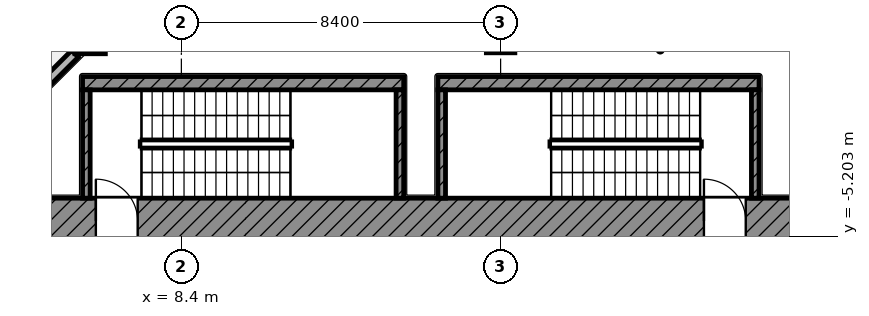
"""IFC4 building model, lengths in metres.
Left out: names, types, materials, properties, quantities, classifications, styles, units other than length and angle.
Written with IfcOpenShell. Run it as: python <this file> out.ifc"""

import sys

from ifc_helpers import new_model, si_unit, direction, frame, frame_2d, origin, origin_2d, place, context, subcontext, project, spatial, rectangle, extrude, element, fill, save


model = new_model("IFC4")
c1 = context("Model", 3, precision=1e-05, world=origin(), true_north=direction((0.0, 1.0)))
c2 = subcontext(c1, "Body", "Model", "MODEL_VIEW")
j1 = project(units=[si_unit("LENGTHUNIT", "METRE"), si_unit("PLANEANGLEUNIT", "RADIAN")], contexts=[c1])
p1 = place(None, origin())
s1 = spatial("IfcSite", under=j1, at=p1, CompositionType="ELEMENT")
p2 = place(p1, origin())
s2 = spatial("IfcBuilding", under=s1, at=p2, CompositionType="ELEMENT")
p3 = place(p2, frame((0.0, 0.0, 272.6)))
s3 = spatial("IfcBuildingStorey", under=s2, at=p3, CompositionType="ELEMENT", Elevation=272.6)
p4 = place(p3, frame((6.0, 0.0, 0.0), z_axis=(0.0, 0.0, 1.0), x_axis=(1.0, 0.0, 0.0)))
e1 = element("IfcColumn", 1, at=p4, inside=s3, PredefinedType="COLUMN", context=c2, shape_type="SweptSolid", body=[
    extrude(rectangle(XDim=0.8, YDim=0.8, at=origin_2d()), origin(), (0.0, 0.0, 1.0), 5.0),
])
p5 = place(p3, frame((16.8, 0.0, 0.0), z_axis=(0.0, 0.0, 1.0), x_axis=(1.0, 0.0, 0.0)))
e2 = element("IfcColumn", 2, at=p5, inside=s3, PredefinedType="COLUMN", context=c2, shape_type="SweptSolid", body=[
    extrude(rectangle(XDim=0.75, YDim=0.75, at=origin_2d()), origin(), (0.0, 0.0, 1.0), 5.0),
])
p6 = place(p3, frame((5.6, -0.4, 0.0), z_axis=(0.0, 0.0, 1.0), x_axis=(-0.707106781187, -0.707106781187, 0.0)))
e3 = element("IfcWall", 3, at=p6, inside=s3, PredefinedType="SOLIDWALL", context=c2, shape_type="SweptSolid", body=[
    extrude(rectangle(XDim=7.354, YDim=0.25, at=frame_2d((3.677, 0.0))), origin(), (0.0, 0.0, 1.0), 3.3),
])
p7 = place(p3, frame((4.2, -4.8, 0.0), z_axis=(0.0, 0.0, 1.0), x_axis=(1.0, 0.0, 0.0)))
e4 = element("IfcWall", 4, at=p7, inside=s3, PredefinedType="SHEAR", context=c2, shape_type="SweptSolid", body=[
    extrude(rectangle(XDim=20.5, YDim=1.2, at=frame_2d((10.25, 0.0))), origin(), (0.0, 0.0, 1.0), 4.4),
])
p8 = place(p7, frame((1.95, 0.0, 0.0)))
e5 = element("IfcOpeningElement", 5, at=p8, cuts=e4, PredefinedType="OPENING", context=c2, shape_type="SweptSolid", body=[
    extrude(rectangle(XDim=1.1, YDim=2.1, at=frame_2d((0.55, 1.05))), frame((0.0, 0.61, 0.0), z_axis=(0.0, -1.0, 0.0), x_axis=(1.0, 0.0, 0.0)), (0.0, 0.0, 1.0), 1.22),
])
p9 = place(p7, frame((17.95, 0.0, 0.0)))
e6 = element("IfcOpeningElement", 6, at=p9, cuts=e4, PredefinedType="OPENING", context=c2, shape_type="SweptSolid", body=[
    extrude(rectangle(XDim=1.1, YDim=2.1, at=frame_2d((0.55, 1.05))), frame((0.0, 0.61, 0.0), z_axis=(0.0, -1.0, 0.0), x_axis=(1.0, 0.0, 0.0)), (0.0, 0.0, 1.0), 1.22),
])
p10 = place(p3, frame((5.8, -1.175, 0.0), z_axis=(0.0, 0.0, 1.0), x_axis=(1.0, 0.0, 0.0)))
e7 = element("IfcWall", 7, at=p10, inside=s3, PredefinedType="SHEAR", context=c2, shape_type="SweptSolid", body=[
    extrude(rectangle(XDim=8.45, YDim=0.35, at=frame_2d((4.225, 0.0))), origin(), (0.0, 0.0, 1.0), 4.4),
])
for number, where, z_axis, x_axis in (
    (8, (5.9, -4.2, 0.0), (0.0, 0.0, 1.0), (0.0, 1.0, 0.0)),
    (9, (14.15, -4.2, 0.0), (0.0, 0.0, 1.0), (0.0, 1.0, 0.0)),
):
    element("IfcWall", number, at=place(p3, frame(where, z_axis=z_axis, x_axis=x_axis)), inside=s3, PredefinedType="SHEAR", context=c2, shape_type="SweptSolid", body=[
        extrude(rectangle(XDim=2.85, YDim=0.2, at=frame_2d((1.425, 0.0))), origin(), (0.0, 0.0, 1.0), 4.4),
    ])
p11 = place(p3, frame((15.15, -1.175, 0.0), z_axis=(0.0, 0.0, 1.0), x_axis=(1.0, 0.0, 0.0)))
e10 = element("IfcWall", 10, at=p11, inside=s3, PredefinedType="SHEAR", context=c2, shape_type="SweptSolid", body=[
    extrude(rectangle(XDim=8.45, YDim=0.35, at=frame_2d((4.225, 0.0))), origin(), (0.0, 0.0, 1.0), 4.4),
])
for number, where, z_axis, x_axis in (
    (11, (15.25, -4.2, 0.0), (0.0, 0.0, 1.0), (0.0, 1.0, 0.0)),
    (12, (23.5, -4.2, 0.0), (0.0, 0.0, 1.0), (0.0, 1.0, 0.0)),
):
    element("IfcWall", number, at=place(p3, frame(where, z_axis=z_axis, x_axis=x_axis)), inside=s3, PredefinedType="SHEAR", context=c2, shape_type="SweptSolid", body=[
        extrude(rectangle(XDim=2.85, YDim=0.2, at=frame_2d((1.425, 0.0))), origin(), (0.0, 0.0, 1.0), 4.4),
    ])
p12 = place(p8, origin())
e13 = element("IfcDoor", 13, at=p12, inside=s3, OperationType="SINGLE_SWING_LEFT", PredefinedType="DOOR", context=c2, shape_type="SweptSolid", body=[
    extrude(rectangle(XDim=1.1, YDim=2.1, at=frame_2d((0.55, 1.05))), frame((0.0, 0.025, 0.0), z_axis=(0.0, -1.0, 0.0), x_axis=(1.0, 0.0, 0.0)), (0.0, 0.0, 1.0), 0.05),
])
fill(e5, e13)
p13 = place(p9, origin())
e14 = element("IfcDoor", 14, at=p13, inside=s3, OperationType="SINGLE_SWING_LEFT", PredefinedType="DOOR", context=c2, shape_type="SweptSolid", body=[
    extrude(rectangle(XDim=1.1, YDim=2.1, at=frame_2d((0.55, 1.05))), frame((0.0, 0.025, 0.0), z_axis=(0.0, -1.0, 0.0), x_axis=(1.0, 0.0, 0.0)), (0.0, 0.0, 1.0), 0.05),
])
fill(e6, e14)
save(model, sys.argv[1])
